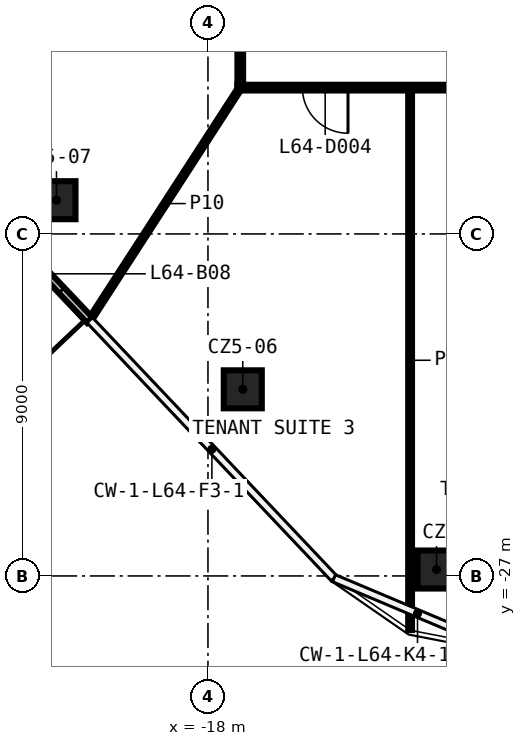
"""IFC4 building model, lengths in metres.
Left out: names, types, materials, properties, quantities, classifications, styles, units other than length and angle.
Written with IfcOpenShell. Run it as: python <this file> out.ifc"""

import sys

from ifc_helpers import new_model, si_unit, direction, frame, frame_2d, origin, origin_2d, place, context, subcontext, project, spatial, rectangle, extrude, element, fill, save


model = new_model("IFC4")
c1 = context("Model", 3, precision=1e-05, world=origin(), true_north=direction((0.0, 1.0)))
c2 = subcontext(c1, "Body", "Model", "MODEL_VIEW")
j1 = project(units=[si_unit("LENGTHUNIT", "METRE"), si_unit("PLANEANGLEUNIT", "RADIAN")], contexts=[c1])
p1 = place(None, origin())
s1 = spatial("IfcSite", under=j1, at=p1, CompositionType="ELEMENT")
p2 = place(p1, origin())
s2 = spatial("IfcBuilding", under=s1, at=p2, CompositionType="ELEMENT")
p3 = place(p2, frame((0.0, 0.0, 302.6)))
s3 = spatial("IfcBuildingStorey", under=s2, at=p3, CompositionType="ELEMENT", Elevation=302.6)
for number, where, z_axis, x_axis in (
    (1, (-11.985, -26.831, 0.0), (0.0, 0.0, 1.0), (1.0, 0.0, 0.0)),
    (2, (-17.084, -22.089, 0.0), (0.0, 0.0, 1.0), (1.0, 0.0, 0.0)),
    (3, (-21.986, -17.112, 0.0), (0.0, 0.0, 1.0), (1.0, 0.0, 0.0)),
):
    element("IfcColumn", number, at=place(p3, frame(where, z_axis=z_axis, x_axis=x_axis)), inside=s3, PredefinedType="COLUMN", context=c2, shape_type="SweptSolid", body=[
        extrude(rectangle(XDim=1.0, YDim=1.0, at=origin_2d()), origin(), (0.0, 0.0, 1.0), 3.82),
    ])
p4 = place(p3, frame((17.225, -14.15, 0.0), z_axis=(0.0, 0.0, 1.0), x_axis=(-1.0, 0.0, 0.0)))
e4 = element("IfcWall", 4, at=p4, inside=s3, PredefinedType="PARTITIONING", context=c2, shape_type="SweptSolid", body=[
    extrude(rectangle(XDim=34.45, YDim=0.15, at=frame_2d((17.225, 0.0))), origin(), (0.0, 0.0, 1.0), 3.82),
])
p5 = place(p4, frame((31.54, 0.0, 0.0)))
e5 = element("IfcOpeningElement", 5, at=p5, cuts=e4, PredefinedType="OPENING", context=c2, shape_type="SweptSolid", body=[
    extrude(rectangle(XDim=1.2, YDim=2.1, at=frame_2d((0.6, 1.05))), frame((0.0, 0.085, 0.0), z_axis=(0.0, -1.0, 0.0), x_axis=(1.0, 0.0, 0.0)), (0.0, 0.0, 1.0), 0.17),
])
p6 = place(p4, frame((25.804, 0.0, 0.0)))
e6 = element("IfcOpeningElement", 6, at=p6, cuts=e4, PredefinedType="OPENING", context=c2, shape_type="SweptSolid", body=[
    extrude(rectangle(XDim=1.2, YDim=2.1, at=frame_2d((0.6, 1.05))), frame((0.0, 0.085, 0.0), z_axis=(0.0, -1.0, 0.0), x_axis=(1.0, 0.0, 0.0)), (0.0, 0.0, 1.0), 0.17),
])
p7 = place(p4, frame((17.681, 0.0, 0.0)))
e7 = element("IfcOpeningElement", 7, at=p7, cuts=e4, PredefinedType="OPENING", context=c2, shape_type="SweptSolid", body=[
    extrude(rectangle(XDim=1.2, YDim=2.1, at=frame_2d((0.6, 1.05))), frame((0.0, 0.085, 0.0), z_axis=(0.0, -1.0, 0.0), x_axis=(1.0, 0.0, 0.0)), (0.0, 0.0, 1.0), 0.17),
])
p8 = place(p4, frame((10.752, 0.0, 0.0)))
e8 = element("IfcOpeningElement", 8, at=p8, cuts=e4, PredefinedType="OPENING", context=c2, shape_type="SweptSolid", body=[
    extrude(rectangle(XDim=1.2, YDim=2.1, at=frame_2d((0.6, 1.05))), frame((0.0, 0.085, 0.0), z_axis=(0.0, -1.0, 0.0), x_axis=(1.0, 0.0, 0.0)), (0.0, 0.0, 1.0), 0.17),
])
p9 = place(p4, frame((6.133, 0.0, 0.0)))
e9 = element("IfcOpeningElement", 9, at=p9, cuts=e4, PredefinedType="OPENING", context=c2, shape_type="SweptSolid", body=[
    extrude(rectangle(XDim=1.2, YDim=2.1, at=frame_2d((0.6, 1.05))), frame((0.0, 0.085, 0.0), z_axis=(0.0, -1.0, 0.0), x_axis=(1.0, 0.0, 0.0)), (0.0, 0.0, 1.0), 0.17),
])
p10 = place(p4, frame((1.851, 0.0, 0.0)))
e10 = element("IfcOpeningElement", 10, at=p10, cuts=e4, PredefinedType="OPENING", context=c2, shape_type="SweptSolid", body=[
    extrude(rectangle(XDim=1.2, YDim=2.1, at=frame_2d((0.6, 1.05))), frame((0.0, 0.085, 0.0), z_axis=(0.0, -1.0, 0.0), x_axis=(1.0, 0.0, 0.0)), (0.0, 0.0, 1.0), 0.17),
])
p11 = place(p3, frame((-21.099, -20.252, 0.0), z_axis=(0.0, 0.0, 1.0), x_axis=(0.543308378863, 0.839533206882, 0.0)))
e11 = element("IfcWall", 11, at=p11, inside=s3, PredefinedType="PARTITIONING", context=c2, shape_type="SweptSolid", body=[
    extrude(rectangle(XDim=7.268, YDim=0.1, at=frame_2d((3.634, 0.0))), origin(), (0.0, 0.0, 1.0), 3.82),
])
p12 = place(p3, frame((-12.681, -28.424, 0.0), z_axis=(0.0, 0.0, 1.0), x_axis=(0.0, 1.0, 0.0)))
e12 = element("IfcWall", 12, at=p12, inside=s3, PredefinedType="PARTITIONING", context=c2, shape_type="SweptSolid", body=[
    extrude(rectangle(XDim=14.199, YDim=0.1, at=frame_2d((7.1, 0.0))), origin(), (0.0, 0.0, 1.0), 3.82),
])
p13 = place(p3, frame((-17.15, -14.075, 0.0), z_axis=(0.0, 0.0, 1.0), x_axis=(0.0, 1.0, 0.0)))
e13 = element("IfcWall", 13, at=p13, inside=s3, PredefinedType="PARTITIONING", context=c2, shape_type="SweptSolid", body=[
    extrude(rectangle(XDim=28.15, YDim=0.15, at=frame_2d((14.075, 0.0))), origin(), (0.0, 0.0, 1.0), 3.82),
])
p14 = place(p13, frame((11.151, 0.0, 0.0)))
e14 = element("IfcOpeningElement", 14, at=p14, cuts=e13, PredefinedType="OPENING", context=c2, shape_type="SweptSolid", body=[
    extrude(rectangle(XDim=1.2, YDim=2.1, at=frame_2d((0.6, 1.05))), frame((0.0, 0.085, 0.0), z_axis=(0.0, -1.0, 0.0), x_axis=(1.0, 0.0, 0.0)), (0.0, 0.0, 1.0), 0.17),
])
p15 = place(p13, frame((5.555, 0.0, 0.0)))
e15 = element("IfcOpeningElement", 15, at=p15, cuts=e13, PredefinedType="OPENING", context=c2, shape_type="SweptSolid", body=[
    extrude(rectangle(XDim=1.2, YDim=2.1, at=frame_2d((0.6, 1.05))), frame((0.0, 0.085, 0.0), z_axis=(0.0, -1.0, 0.0), x_axis=(1.0, 0.0, 0.0)), (0.0, 0.0, 1.0), 0.17),
])
p16 = place(p13, frame((1.7, 0.0, 0.0)))
e16 = element("IfcOpeningElement", 16, at=p16, cuts=e13, PredefinedType="OPENING", context=c2, shape_type="SweptSolid", body=[
    extrude(rectangle(XDim=1.2, YDim=2.1, at=frame_2d((0.6, 1.05))), frame((0.0, 0.085, 0.0), z_axis=(0.0, -1.0, 0.0), x_axis=(1.0, 0.0, 0.0)), (0.0, 0.0, 1.0), 0.17),
])
p17 = place(p13, frame((24.41, 0.0, 0.0)))
e17 = element("IfcOpeningElement", 17, at=p17, cuts=e13, PredefinedType="OPENING", context=c2, shape_type="SweptSolid", body=[
    extrude(rectangle(XDim=1.2, YDim=2.1, at=frame_2d((0.6, 1.05))), frame((0.0, 0.085, 0.0), z_axis=(0.0, -1.0, 0.0), x_axis=(1.0, 0.0, 0.0)), (0.0, 0.0, 1.0), 0.17),
])
p18 = place(p13, frame((20.29, 0.0, 0.0)))
e18 = element("IfcOpeningElement", 18, at=p18, cuts=e13, PredefinedType="OPENING", context=c2, shape_type="SweptSolid", body=[
    extrude(rectangle(XDim=1.2, YDim=2.1, at=frame_2d((0.6, 1.05))), frame((0.0, 0.085, 0.0), z_axis=(0.0, -1.0, 0.0), x_axis=(1.0, 0.0, 0.0)), (0.0, 0.0, 1.0), 0.17),
])
p19 = place(p13, frame((16.17, 0.0, 0.0)))
e19 = element("IfcOpeningElement", 19, at=p19, cuts=e13, PredefinedType="OPENING", context=c2, shape_type="SweptSolid", body=[
    extrude(rectangle(XDim=1.2, YDim=2.1, at=frame_2d((0.6, 1.05))), frame((0.0, 0.085, 0.0), z_axis=(0.0, -1.0, 0.0), x_axis=(1.0, 0.0, 0.0)), (0.0, 0.0, 1.0), 0.17),
])
p20 = place(p3, frame((-27.543, -13.471, 0.0), z_axis=(0.0, 0.0, 1.0), x_axis=(0.687314061727, -0.726360365488, 0.0)))
e20 = element("IfcWall", 20, at=p20, inside=s3, PredefinedType="SOLIDWALL", context=c2, shape_type="SweptSolid", body=[
    extrude(rectangle(XDim=9.36, YDim=0.2, at=frame_2d((4.68, 0.0))), origin(), (0.0, 0.0, 1.0), 3.82),
])
p21 = place(p20, frame((2.0, 0.0, 0.6)))
e21 = element("IfcOpeningElement", 21, at=p21, cuts=e20, PredefinedType="OPENING", context=c2, shape_type="SweptSolid", body=[
    extrude(rectangle(XDim=1.6, YDim=2.4, at=frame_2d((0.8, 1.2))), frame((0.0, 0.11, 0.0), z_axis=(0.0, -1.0, 0.0), x_axis=(1.0, 0.0, 0.0)), (0.0, 0.0, 1.0), 0.22),
])
p22 = place(p20, frame((0.5, 0.0, 0.0)))
e22 = element("IfcOpeningElement", 22, at=p22, cuts=e20, PredefinedType="OPENING", context=c2, shape_type="SweptSolid", body=[
    extrude(rectangle(XDim=1.2, YDim=2.4, at=frame_2d((0.6, 1.2))), frame((0.0, 0.11, 0.0), z_axis=(0.0, -1.0, 0.0), x_axis=(1.0, 0.0, 0.0)), (0.0, 0.0, 1.0), 0.22),
])
p23 = place(p20, frame((5.18, 0.0, 0.6)))
e23 = element("IfcOpeningElement", 23, at=p23, cuts=e20, PredefinedType="OPENING", context=c2, shape_type="SweptSolid", body=[
    extrude(rectangle(XDim=1.6, YDim=2.4, at=frame_2d((0.8, 1.2))), frame((0.0, 0.11, 0.0), z_axis=(0.0, -1.0, 0.0), x_axis=(1.0, 0.0, 0.0)), (0.0, 0.0, 1.0), 0.22),
])
p24 = place(p20, frame((7.08, 0.0, 0.0)))
e24 = element("IfcOpeningElement", 24, at=p24, cuts=e20, PredefinedType="OPENING", context=c2, shape_type="SweptSolid", body=[
    extrude(rectangle(XDim=1.2, YDim=2.4, at=frame_2d((0.6, 1.2))), frame((0.0, 0.11, 0.0), z_axis=(0.0, -1.0, 0.0), x_axis=(1.0, 0.0, 0.0)), (0.0, 0.0, 1.0), 0.22),
])
p25 = place(p5, origin())
e25 = element("IfcDoor", 25, at=p25, inside=s3, OperationType="SINGLE_SWING_LEFT", PredefinedType="DOOR", context=c2, shape_type="SweptSolid", body=[
    extrude(rectangle(XDim=1.2, YDim=2.1, at=frame_2d((0.6, 1.05))), frame((0.0, 0.025, 0.0), z_axis=(0.0, -1.0, 0.0), x_axis=(1.0, 0.0, 0.0)), (0.0, 0.0, 1.0), 0.05),
])
fill(e5, e25)
p26 = place(p24, origin())
e26 = element("IfcDoor", 26, at=p26, inside=s3, OperationType="SLIDING_TO_LEFT", PredefinedType="DOOR", context=c2, shape_type="SweptSolid", body=[
    extrude(rectangle(XDim=1.2, YDim=2.4, at=frame_2d((0.6, 1.2))), frame((0.0, 0.025, 0.0), z_axis=(0.0, -1.0, 0.0), x_axis=(1.0, 0.0, 0.0)), (0.0, 0.0, 1.0), 0.05),
])
fill(e24, e26)
save(model, sys.argv[1])
